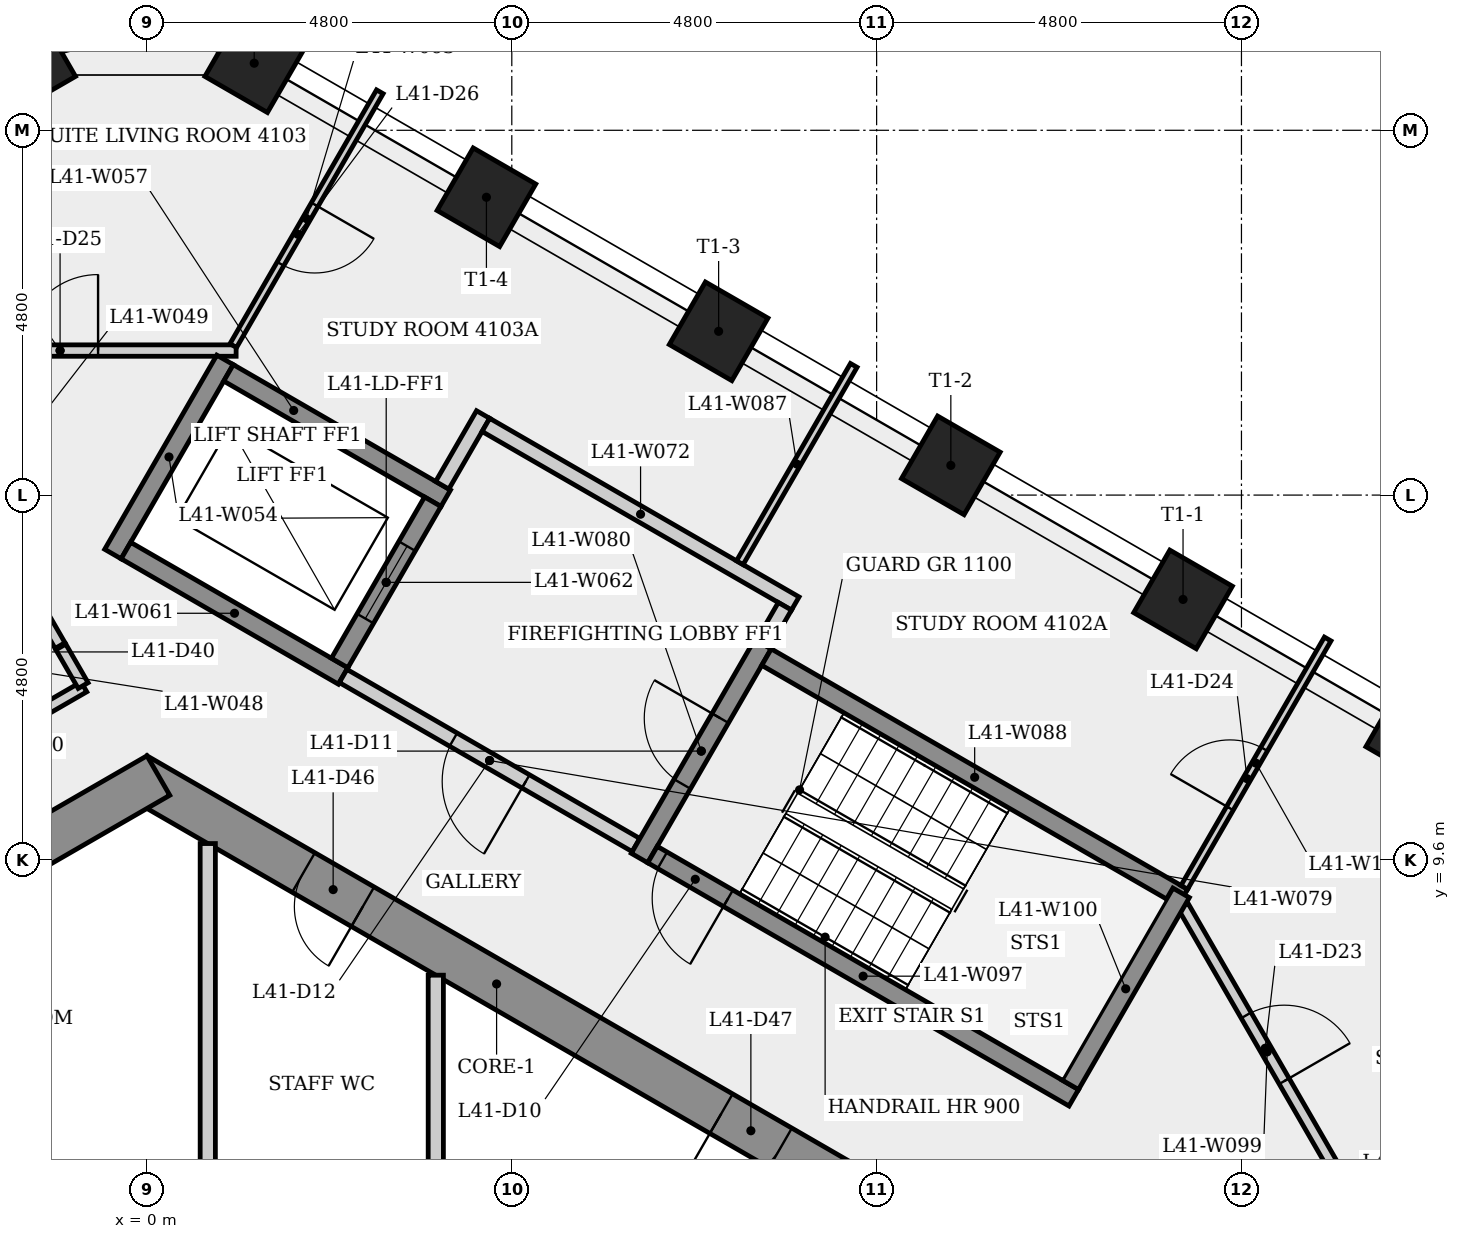
"""IFC4 building model, lengths in metres.
Left out: names, types, materials, properties, quantities, classifications, styles, units other than length and angle.
Written with IfcOpenShell. Run it as: python <this file> out.ifc"""

import sys

from ifc_helpers import new_model, si_unit, direction, frame, frame_2d, origin, origin_2d, place, context, subcontext, project, spatial, rectangle, extrude, element, fill, save


model = new_model("IFC4")
c1 = context("Model", 3, precision=1e-05, world=origin(), true_north=direction((0.0, 1.0)))
c2 = subcontext(c1, "Body", "Model", "MODEL_VIEW")
j1 = project(units=[si_unit("LENGTHUNIT", "METRE"), si_unit("PLANEANGLEUNIT", "RADIAN")], contexts=[c1])
p1 = place(None, origin())
s1 = spatial("IfcSite", under=j1, at=p1, CompositionType="ELEMENT")
p2 = place(p1, origin())
s2 = spatial("IfcBuilding", under=s1, at=p2, CompositionType="ELEMENT")
p3 = place(p2, frame((0.0, 0.0, 156.1)))
s3 = spatial("IfcBuildingStorey", under=s2, at=p3, CompositionType="ELEMENT", Elevation=156.1)
p4 = place(p3, frame((9.35, 5.225, 0.0), z_axis=(0.0, 0.0, 1.0), x_axis=(-0.866023993627, 0.500002442456, 0.0)))
e1 = element("IfcWall", 1, at=p4, inside=s3, PredefinedType="SHEAR", context=c2, shape_type="SweptSolid", body=[
    extrude(rectangle(XDim=10.97, YDim=0.6, at=frame_2d((5.485, 0.0))), origin(), (0.0, 0.0, 1.0), 3.4),
])
p5 = place(p4, frame((7.518, 0.0, 0.0)))
e2 = element("IfcOpeningElement", 2, at=p5, cuts=e1, PredefinedType="OPENING", context=c2, shape_type="SweptSolid", body=[
    extrude(rectangle(XDim=0.9, YDim=2.1, at=frame_2d((0.45, 1.05))), frame((0.0, 0.31, 0.0), z_axis=(0.0, -1.0, 0.0), x_axis=(1.0, 0.0, 0.0)), (0.0, 0.0, 1.0), 0.62),
])
p6 = place(p4, frame((1.172, 0.0, 0.0)))
e3 = element("IfcOpeningElement", 3, at=p6, cuts=e1, PredefinedType="OPENING", context=c2, shape_type="SweptSolid", body=[
    extrude(rectangle(XDim=0.9, YDim=2.1, at=frame_2d((0.45, 1.05))), frame((0.0, 0.31, 0.0), z_axis=(0.0, -1.0, 0.0), x_axis=(1.0, 0.0, 0.0)), (0.0, 0.0, 1.0), 0.62),
])
p7 = place(p3, frame((0.15, 10.71, 0.0), z_axis=(0.0, 0.0, 1.0), x_axis=(-0.866023993627, -0.500002442456, 0.0)))
e4 = element("IfcWall", 4, at=p7, inside=s3, PredefinedType="SHEAR", context=c2, shape_type="SweptSolid", body=[
    extrude(rectangle(XDim=10.97, YDim=0.6, at=frame_2d((5.485, 0.0))), origin(), (0.0, 0.0, 1.0), 3.4),
])
p8 = place(p7, frame((6.243, 0.0, 0.0)))
e5 = element("IfcOpeningElement", 5, at=p8, cuts=e4, PredefinedType="OPENING", context=c2, shape_type="SweptSolid", body=[
    extrude(rectangle(XDim=0.9, YDim=2.1, at=frame_2d((0.45, 1.05))), frame((0.0, 0.31, 0.0), z_axis=(0.0, -1.0, 0.0), x_axis=(1.0, 0.0, 0.0)), (0.0, 0.0, 1.0), 0.62),
])
for number, where, z_axis, x_axis in (
    (6, (16.687, 11.263, 0.0), (0.0, 0.0, 1.0), (0.5, 0.866, 0.0)),
    (7, (13.631, 13.027, 0.0), (0.0, 0.0, 1.0), (0.5, 0.866, 0.0)),
    (8, (10.576, 14.791, 0.0), (0.0, 0.0, 1.0), (0.5, 0.866, 0.0)),
    (9, (7.521, 16.555, 0.0), (0.0, 0.0, 1.0), (0.5, 0.866, 0.0)),
    (10, (4.466, 18.319, 0.0), (0.0, 0.0, 1.0), (0.5, 0.866, 0.0)),
    (11, (1.411, 20.083, 0.0), (0.0, 0.0, 1.0), (0.5, 0.866, 0.0)),
    (12, (-1.589, 20.083, 0.0), (0.0, 0.0, 1.0), (-0.5, 0.866, 0.0)),
):
    element("IfcColumn", number, at=place(p3, frame(where, z_axis=z_axis, x_axis=x_axis)), inside=s3, PredefinedType="COLUMN", context=c2, shape_type="SweptSolid", body=[
        extrude(rectangle(XDim=0.95, YDim=0.95, at=origin_2d()), origin(), (0.0, 0.0, 1.0), 3.4),
    ])
p9 = place(p3, frame((-9.805, 6.694, 0.0), z_axis=(0.0, 0.0, 1.0), x_axis=(0.866028286753, 0.499995006518, 0.0)))
e13 = element("IfcWall", 13, at=p9, inside=s3, PredefinedType="PARTITIONING", context=c2, shape_type="SweptSolid", body=[
    extrude(rectangle(XDim=10.364, YDim=0.15, at=frame_2d((5.182, 0.0))), origin(), (0.0, 0.0, 1.0), 3.05),
])
p10 = place(p9, frame((3.805, 0.0, 0.0)))
e14 = element("IfcOpeningElement", 14, at=p10, cuts=e13, PredefinedType="OPENING", context=c2, shape_type="SweptSolid", body=[
    extrude(rectangle(XDim=0.9, YDim=2.1, at=frame_2d((0.45, 1.05))), frame((0.0, 0.085, 0.0), z_axis=(0.0, -1.0, 0.0), x_axis=(1.0, 0.0, 0.0)), (0.0, 0.0, 1.0), 0.17),
])
p11 = place(p3, frame((-3.46, 16.302, 0.0), z_axis=(0.0, 0.0, 1.0), x_axis=(1.0, 0.0, 0.0)))
e15 = element("IfcWall", 15, at=p11, inside=s3, PredefinedType="PARTITIONING", context=c2, shape_type="SweptSolid", body=[
    extrude(rectangle(XDim=4.633, YDim=0.15, at=frame_2d((2.316, 0.0))), origin(), (0.0, 0.0, 1.0), 3.05),
])
p12 = place(p11, frame((1.816, 0.0, 0.0)))
e16 = element("IfcOpeningElement", 16, at=p12, cuts=e15, PredefinedType="OPENING", context=c2, shape_type="SweptSolid", body=[
    extrude(rectangle(XDim=1.0, YDim=2.1, at=frame_2d((0.5, 1.05))), frame((0.0, 0.085, 0.0), z_axis=(0.0, -1.0, 0.0), x_axis=(1.0, 0.0, 0.0)), (0.0, 0.0, 1.0), 0.17),
])
p13 = place(p3, frame((-1.143, 12.42, 0.0), z_axis=(0.0, 0.0, 1.0), x_axis=(-0.500005339912, 0.866022320763, 0.0)))
e17 = element("IfcWall", 17, at=p13, inside=s3, PredefinedType="PARTITIONING", context=c2, shape_type="SweptSolid", body=[
    extrude(rectangle(XDim=4.408, YDim=0.15, at=frame_2d((2.204, 0.0))), origin(), (0.0, 0.0, 1.0), 3.05),
])
p14 = place(p13, frame((1.754, 0.0, 0.0)))
e18 = element("IfcOpeningElement", 18, at=p14, cuts=e17, PredefinedType="OPENING", context=c2, shape_type="SweptSolid", body=[
    extrude(rectangle(XDim=0.9, YDim=2.1, at=frame_2d((0.45, 1.05))), frame((0.0, 0.085, 0.0), z_axis=(0.0, -1.0, 0.0), x_axis=(1.0, 0.0, 0.0)), (0.0, 0.0, 1.0), 0.17),
])
p15 = place(p3, frame((-1.133, 12.402, 0.0), z_axis=(0.0, 0.0, 1.0), x_axis=(0.499938297808, -0.866061024631, 0.0)))
e19 = element("IfcWall", 19, at=p15, inside=s3, PredefinedType="PARTITIONING", context=c2, shape_type="SweptSolid", body=[
    extrude(rectangle(XDim=0.587, YDim=0.15, at=frame_2d((0.294, 0.0))), origin(), (0.0, 0.0, 1.0), 3.05),
])
p16 = place(p3, frame((-0.448, 13.624, 0.0), z_axis=(0.0, 0.0, 1.0), x_axis=(0.500037662692, 0.866003658127, 0.0)))
e20 = element("IfcWall", 20, at=p16, inside=s3, PredefinedType="SHEAR", context=c2, shape_type="SweptSolid", body=[
    extrude(rectangle(XDim=2.95, YDim=0.25, at=frame_2d((1.475, 0.0))), origin(), (0.0, 0.0, 1.0), 3.05),
])
p17 = place(p3, frame((0.8, 9.815, 0.0), z_axis=(0.0, 0.0, 1.0), x_axis=(0.0, -1.0, 0.0)))
e21 = element("IfcWall", 21, at=p17, inside=s3, PredefinedType="PARTITIONING", context=c2, shape_type="SweptSolid", body=[
    extrude(rectangle(XDim=4.54, YDim=0.2, at=frame_2d((2.27, 0.0))), origin(), (0.0, 0.0, 1.0), 3.05),
])
for number, where, z_axis, x_axis in (
    (22, (1.073, 16.008, 0.0), (0.0, 0.0, 1.0), (0.866, -0.5, 0.0)),
    (23, (2.581, 12.02, 0.0), (0.0, 0.0, 1.0), (-0.866, 0.5, 0.0)),
):
    element("IfcWall", number, at=place(p3, frame(where, z_axis=z_axis, x_axis=x_axis)), inside=s3, PredefinedType="SHEAR", context=c2, shape_type="SweptSolid", body=[
        extrude(rectangle(XDim=3.3, YDim=0.25, at=frame_2d((1.65, 0.0))), origin(), (0.0, 0.0, 1.0), 3.05),
    ])
p18 = place(p3, frame((2.535, 12.191, 0.0), z_axis=(0.0, 0.0, 1.0), x_axis=(0.500061746146, 0.865989751695, 0.0)))
e24 = element("IfcWall", 24, at=p18, inside=s3, PredefinedType="SHEAR", context=c2, shape_type="SweptSolid", body=[
    extrude(rectangle(XDim=2.45, YDim=0.25, at=frame_2d((1.225, 0.0))), origin(), (0.0, 0.0, 1.0), 3.4),
])
p19 = place(p18, frame((0.675, 0.0, 0.0)))
e25 = element("IfcOpeningElement", 25, at=p19, cuts=e24, PredefinedType="OPENING", context=c2, shape_type="SweptSolid", body=[
    extrude(rectangle(XDim=1.1, YDim=2.1, at=frame_2d((0.55, 1.05))), frame((0.0, 0.135, 0.0), z_axis=(0.0, -1.0, 0.0), x_axis=(1.0, 0.0, 0.0)), (0.0, 0.0, 1.0), 0.27),
])
p20 = place(p3, frame((3.064, 19.707, 0.0), z_axis=(0.0, 0.0, 1.0), x_axis=(-0.499992798144, -0.866029561738, 0.0)))
e26 = element("IfcWall", 26, at=p20, inside=s3, PredefinedType="PARTITIONING", context=c2, shape_type="SweptSolid", body=[
    extrude(rectangle(XDim=3.856, YDim=0.1, at=frame_2d((1.928, 0.0))), origin(), (0.0, 0.0, 1.0), 3.05),
])
p21 = place(p20, frame((1.714, 0.0, 0.0)))
e27 = element("IfcOpeningElement", 27, at=p21, cuts=e26, PredefinedType="OPENING", context=c2, shape_type="SweptSolid", body=[
    extrude(rectangle(XDim=0.9, YDim=2.1, at=frame_2d((0.45, 1.05))), frame((0.0, 0.06, 0.0), z_axis=(0.0, -1.0, 0.0), x_axis=(1.0, 0.0, 0.0)), (0.0, 0.0, 1.0), 0.12),
])
p22 = place(p3, frame((3.8, 8.083, 0.0), z_axis=(0.0, 0.0, 1.0), x_axis=(0.0, -1.0, 0.0)))
e28 = element("IfcWall", 28, at=p22, inside=s3, PredefinedType="PARTITIONING", context=c2, shape_type="SweptSolid", body=[
    extrude(rectangle(XDim=2.808, YDim=0.2, at=frame_2d((1.404, 0.0))), origin(), (0.0, 0.0, 1.0), 3.05),
])
p23 = place(p3, frame((3.885, 14.529, 0.0), z_axis=(0.0, 0.0, 1.0), x_axis=(0.499997628298, 0.866026773083, 0.0)))
e29 = element("IfcWall", 29, at=p23, inside=s3, PredefinedType="PARTITIONING", context=c2, shape_type="SweptSolid", body=[
    extrude(rectangle(XDim=1.075, YDim=0.2, at=frame_2d((0.538, 0.0))), origin(), (0.0, 0.0, 1.0), 3.05),
])
p24 = place(p3, frame((4.459, 15.323, 0.0), z_axis=(0.0, 0.0, 1.0), x_axis=(0.866016039709, -0.500016218704, 0.0)))
e30 = element("IfcWall", 30, at=p24, inside=s3, PredefinedType="PARTITIONING", context=c2, shape_type="SweptSolid", body=[
    extrude(rectangle(XDim=4.7, YDim=0.2, at=frame_2d((2.35, 0.0))), origin(), (0.0, 0.0, 1.0), 3.05),
])
p25 = place(p3, frame((6.435, 9.795, 0.0), z_axis=(0.0, 0.0, 1.0), x_axis=(-0.866012907634, 0.500021643343, 0.0)))
e31 = element("IfcWall", 31, at=p25, inside=s3, PredefinedType="PARTITIONING", context=c2, shape_type="SweptSolid", body=[
    extrude(rectangle(XDim=4.45, YDim=0.2, at=frame_2d((2.225, 0.0))), origin(), (0.0, 0.0, 1.0), 3.05),
])
p26 = place(p25, frame((1.675, 0.0, 0.0)))
e32 = element("IfcOpeningElement", 32, at=p26, cuts=e31, PredefinedType="OPENING", context=c2, shape_type="SweptSolid", body=[
    extrude(rectangle(XDim=1.1, YDim=2.1, at=frame_2d((0.55, 1.05))), frame((0.0, 0.11, 0.0), z_axis=(0.0, -1.0, 0.0), x_axis=(1.0, 0.0, 0.0)), (0.0, 0.0, 1.0), 0.22),
])
p27 = place(p3, frame((6.48, 9.624, 0.0), z_axis=(0.0, 0.0, 1.0), x_axis=(0.500017246033, 0.866015446554, 0.0)))
e33 = element("IfcWall", 33, at=p27, inside=s3, PredefinedType="SHEAR", context=c2, shape_type="SweptSolid", body=[
    extrude(rectangle(XDim=3.25, YDim=0.25, at=frame_2d((1.625, 0.0))), origin(), (0.0, 0.0, 1.0), 3.05),
])
p28 = place(p27, frame((1.125, 0.0, 0.0)))
e34 = element("IfcOpeningElement", 34, at=p28, cuts=e33, PredefinedType="OPENING", context=c2, shape_type="SweptSolid", body=[
    extrude(rectangle(XDim=1.0, YDim=2.1, at=frame_2d((0.5, 1.05))), frame((0.0, 0.135, 0.0), z_axis=(0.0, -1.0, 0.0), x_axis=(1.0, 0.0, 0.0)), (0.0, 0.0, 1.0), 0.27),
])
p29 = place(p3, frame((7.8, 13.51, 0.0), z_axis=(0.0, 0.0, 1.0), x_axis=(0.499992664208, 0.866029639064, 0.0)))
e35 = element("IfcWall", 35, at=p29, inside=s3, PredefinedType="PARTITIONING", context=c2, shape_type="SweptSolid", body=[
    extrude(rectangle(XDim=2.998, YDim=0.1, at=frame_2d((1.499, 0.0))), origin(), (0.0, 0.0, 1.0), 3.05),
])
p30 = place(p3, frame((8.151, 12.268, 0.0), z_axis=(0.0, 0.0, 1.0), x_axis=(0.866032601554, -0.49998753289, 0.0)))
e36 = element("IfcWall", 36, at=p30, inside=s3, PredefinedType="SHEAR", context=c2, shape_type="SweptSolid", body=[
    extrude(rectangle(XDim=6.325, YDim=0.25, at=frame_2d((3.163, 0.0))), origin(), (0.0, 0.0, 1.0), 3.05),
])
p31 = place(p3, frame((8.393, 12.937, 0.0), z_axis=(0.0, 0.0, 1.0), x_axis=(-0.500065409566, -0.86598763626, 0.0)))
e37 = element("IfcWall", 37, at=p31, inside=s3, PredefinedType="PARTITIONING", context=c2, shape_type="SweptSolid", body=[
    extrude(rectangle(XDim=0.575, YDim=0.2, at=frame_2d((0.288, 0.0))), origin(), (0.0, 0.0, 1.0), 3.05),
])
p32 = place(p3, frame((12.194, 6.47, 0.0), z_axis=(0.0, 0.0, 1.0), x_axis=(-0.866025499775, 0.499999833739, 0.0)))
e38 = element("IfcWall", 38, at=p32, inside=s3, PredefinedType="SHEAR", context=c2, shape_type="SweptSolid", body=[
    extrude(rectangle(XDim=6.4, YDim=0.25, at=frame_2d((3.2, 0.0))), origin(), (0.0, 0.0, 1.0), 3.05),
])
p33 = place(p32, frame((5.25, 0.0, 0.0)))
e39 = element("IfcOpeningElement", 39, at=p33, cuts=e38, PredefinedType="OPENING", context=c2, shape_type="SweptSolid", body=[
    extrude(rectangle(XDim=1.0, YDim=2.1, at=frame_2d((0.5, 1.05))), frame((0.0, 0.135, 0.0), z_axis=(0.0, -1.0, 0.0), x_axis=(1.0, 0.0, 0.0)), (0.0, 0.0, 1.0), 0.27),
])
p34 = place(p3, frame((13.631, 8.993, 0.0), z_axis=(0.0, 0.0, 1.0), x_axis=(0.500013290014, -0.866017730655, 0.0)))
e40 = element("IfcWall", 40, at=p34, inside=s3, PredefinedType="PARTITIONING", context=c2, shape_type="SweptSolid", body=[
    extrude(rectangle(XDim=4.433, YDim=0.15, at=frame_2d((2.216, 0.0))), origin(), (0.0, 0.0, 1.0), 3.05),
])
p35 = place(p34, frame((1.661, 0.0, 0.0)))
e41 = element("IfcOpeningElement", 41, at=p35, cuts=e40, PredefinedType="OPENING", context=c2, shape_type="SweptSolid", body=[
    extrude(rectangle(XDim=1.0, YDim=2.1, at=frame_2d((0.5, 1.05))), frame((0.0, 0.085, 0.0), z_axis=(0.0, -1.0, 0.0), x_axis=(1.0, 0.0, 0.0)), (0.0, 0.0, 1.0), 0.17),
])
p36 = place(p3, frame((13.606, 9.167, 0.0), z_axis=(0.0, 0.0, 1.0), x_axis=(-0.499983307531, -0.866035040971, 0.0)))
e42 = element("IfcWall", 42, at=p36, inside=s3, PredefinedType="SHEAR", context=c2, shape_type="SweptSolid", body=[
    extrude(rectangle(XDim=2.917, YDim=0.25, at=frame_2d((1.458, 0.0))), origin(), (0.0, 0.0, 1.0), 3.05),
])
p37 = place(p3, frame((13.648, 9.239, 0.0), z_axis=(0.0, 0.0, 1.0), x_axis=(0.500008086624, 0.86602073492, 0.0)))
e43 = element("IfcWall", 43, at=p37, inside=s3, PredefinedType="PARTITIONING", context=c2, shape_type="SweptSolid", body=[
    extrude(rectangle(XDim=3.773, YDim=0.1, at=frame_2d((1.887, 0.0))), origin(), (0.0, 0.0, 1.0), 3.05),
])
p38 = place(p37, frame((1.201, 0.0, 0.0)))
e44 = element("IfcOpeningElement", 44, at=p38, cuts=e43, PredefinedType="OPENING", context=c2, shape_type="SweptSolid", body=[
    extrude(rectangle(XDim=0.9, YDim=2.1, at=frame_2d((0.45, 1.05))), frame((0.0, 0.06, 0.0), z_axis=(0.0, -1.0, 0.0), x_axis=(1.0, 0.0, 0.0)), (0.0, 0.0, 1.0), 0.12),
])
p39 = place(p33, origin())
e45 = element("IfcDoor", 45, at=p39, inside=s3, OperationType="SINGLE_SWING_LEFT", PredefinedType="DOOR", context=c2, shape_type="SweptSolid", body=[
    extrude(rectangle(XDim=1.0, YDim=2.1, at=frame_2d((0.5, 1.05))), frame((0.0, 0.025, 0.0), z_axis=(0.0, -1.0, 0.0), x_axis=(1.0, 0.0, 0.0)), (0.0, 0.0, 1.0), 0.05),
])
fill(e39, e45)
p40 = place(p28, origin())
e46 = element("IfcDoor", 46, at=p40, inside=s3, OperationType="SINGLE_SWING_RIGHT", PredefinedType="DOOR", context=c2, shape_type="SweptSolid", body=[
    extrude(rectangle(XDim=1.0, YDim=2.1, at=frame_2d((0.5, 1.05))), frame((0.0, 0.025, 0.0), z_axis=(0.0, -1.0, 0.0), x_axis=(1.0, 0.0, 0.0)), (0.0, 0.0, 1.0), 0.05),
])
fill(e34, e46)
p41 = place(p26, origin())
e47 = element("IfcDoor", 47, at=p41, inside=s3, OperationType="SINGLE_SWING_LEFT", PredefinedType="DOOR", context=c2, shape_type="SweptSolid", body=[
    extrude(rectangle(XDim=1.1, YDim=2.1, at=frame_2d((0.55, 1.05))), frame((0.0, 0.025, 0.0), z_axis=(0.0, -1.0, 0.0), x_axis=(1.0, 0.0, 0.0)), (0.0, 0.0, 1.0), 0.05),
])
fill(e32, e47)
p42 = place(p19, origin())
e48 = element("IfcDoor", 48, at=p42, inside=s3, OperationType="SLIDING_TO_LEFT", PredefinedType="DOOR", context=c2, shape_type="SweptSolid", body=[
    extrude(rectangle(XDim=1.1, YDim=2.1, at=frame_2d((0.55, 1.05))), frame((0.0, 0.025, 0.0), z_axis=(0.0, -1.0, 0.0), x_axis=(1.0, 0.0, 0.0)), (0.0, 0.0, 1.0), 0.05),
])
fill(e25, e48)
p43 = place(p35, origin())
e49 = element("IfcDoor", 49, at=p43, inside=s3, OperationType="SINGLE_SWING_RIGHT", PredefinedType="DOOR", context=c2, shape_type="SweptSolid", body=[
    extrude(rectangle(XDim=1.0, YDim=2.1, at=frame_2d((0.5, 1.05))), frame((0.0, 0.025, 0.0), z_axis=(0.0, -1.0, 0.0), x_axis=(1.0, 0.0, 0.0)), (0.0, 0.0, 1.0), 0.05),
])
fill(e41, e49)
p44 = place(p38, origin())
e50 = element("IfcDoor", 50, at=p44, inside=s3, OperationType="SINGLE_SWING_LEFT", PredefinedType="DOOR", context=c2, shape_type="SweptSolid", body=[
    extrude(rectangle(XDim=0.9, YDim=2.1, at=frame_2d((0.45, 1.05))), frame((0.0, 0.025, 0.0), z_axis=(0.0, -1.0, 0.0), x_axis=(1.0, 0.0, 0.0)), (0.0, 0.0, 1.0), 0.05),
])
fill(e44, e50)
p45 = place(p12, origin())
e51 = element("IfcDoor", 51, at=p45, inside=s3, OperationType="SINGLE_SWING_RIGHT", PredefinedType="DOOR", context=c2, shape_type="SweptSolid", body=[
    extrude(rectangle(XDim=1.0, YDim=2.1, at=frame_2d((0.5, 1.05))), frame((0.0, 0.025, 0.0), z_axis=(0.0, -1.0, 0.0), x_axis=(1.0, 0.0, 0.0)), (0.0, 0.0, 1.0), 0.05),
])
fill(e16, e51)
p46 = place(p21, origin())
e52 = element("IfcDoor", 52, at=p46, inside=s3, OperationType="SINGLE_SWING_LEFT", PredefinedType="DOOR", context=c2, shape_type="SweptSolid", body=[
    extrude(rectangle(XDim=0.9, YDim=2.1, at=frame_2d((0.45, 1.05))), frame((0.0, 0.025, 0.0), z_axis=(0.0, -1.0, 0.0), x_axis=(1.0, 0.0, 0.0)), (0.0, 0.0, 1.0), 0.05),
])
fill(e27, e52)
p47 = place(p5, origin())
e53 = element("IfcDoor", 53, at=p47, inside=s3, OperationType="SINGLE_SWING_LEFT", PredefinedType="DOOR", context=c2, shape_type="SweptSolid", body=[
    extrude(rectangle(XDim=0.9, YDim=2.1, at=frame_2d((0.45, 1.05))), frame((0.0, 0.025, 0.0), z_axis=(0.0, -1.0, 0.0), x_axis=(1.0, 0.0, 0.0)), (0.0, 0.0, 1.0), 0.05),
])
fill(e2, e53)
p48 = place(p6, origin())
e54 = element("IfcDoor", 54, at=p48, inside=s3, OperationType="SINGLE_SWING_RIGHT", PredefinedType="DOOR", context=c2, shape_type="SweptSolid", body=[
    extrude(rectangle(XDim=0.9, YDim=2.1, at=frame_2d((0.45, 1.05))), frame((0.0, 0.025, 0.0), z_axis=(0.0, -1.0, 0.0), x_axis=(1.0, 0.0, 0.0)), (0.0, 0.0, 1.0), 0.05),
])
fill(e3, e54)
save(model, sys.argv[1])
